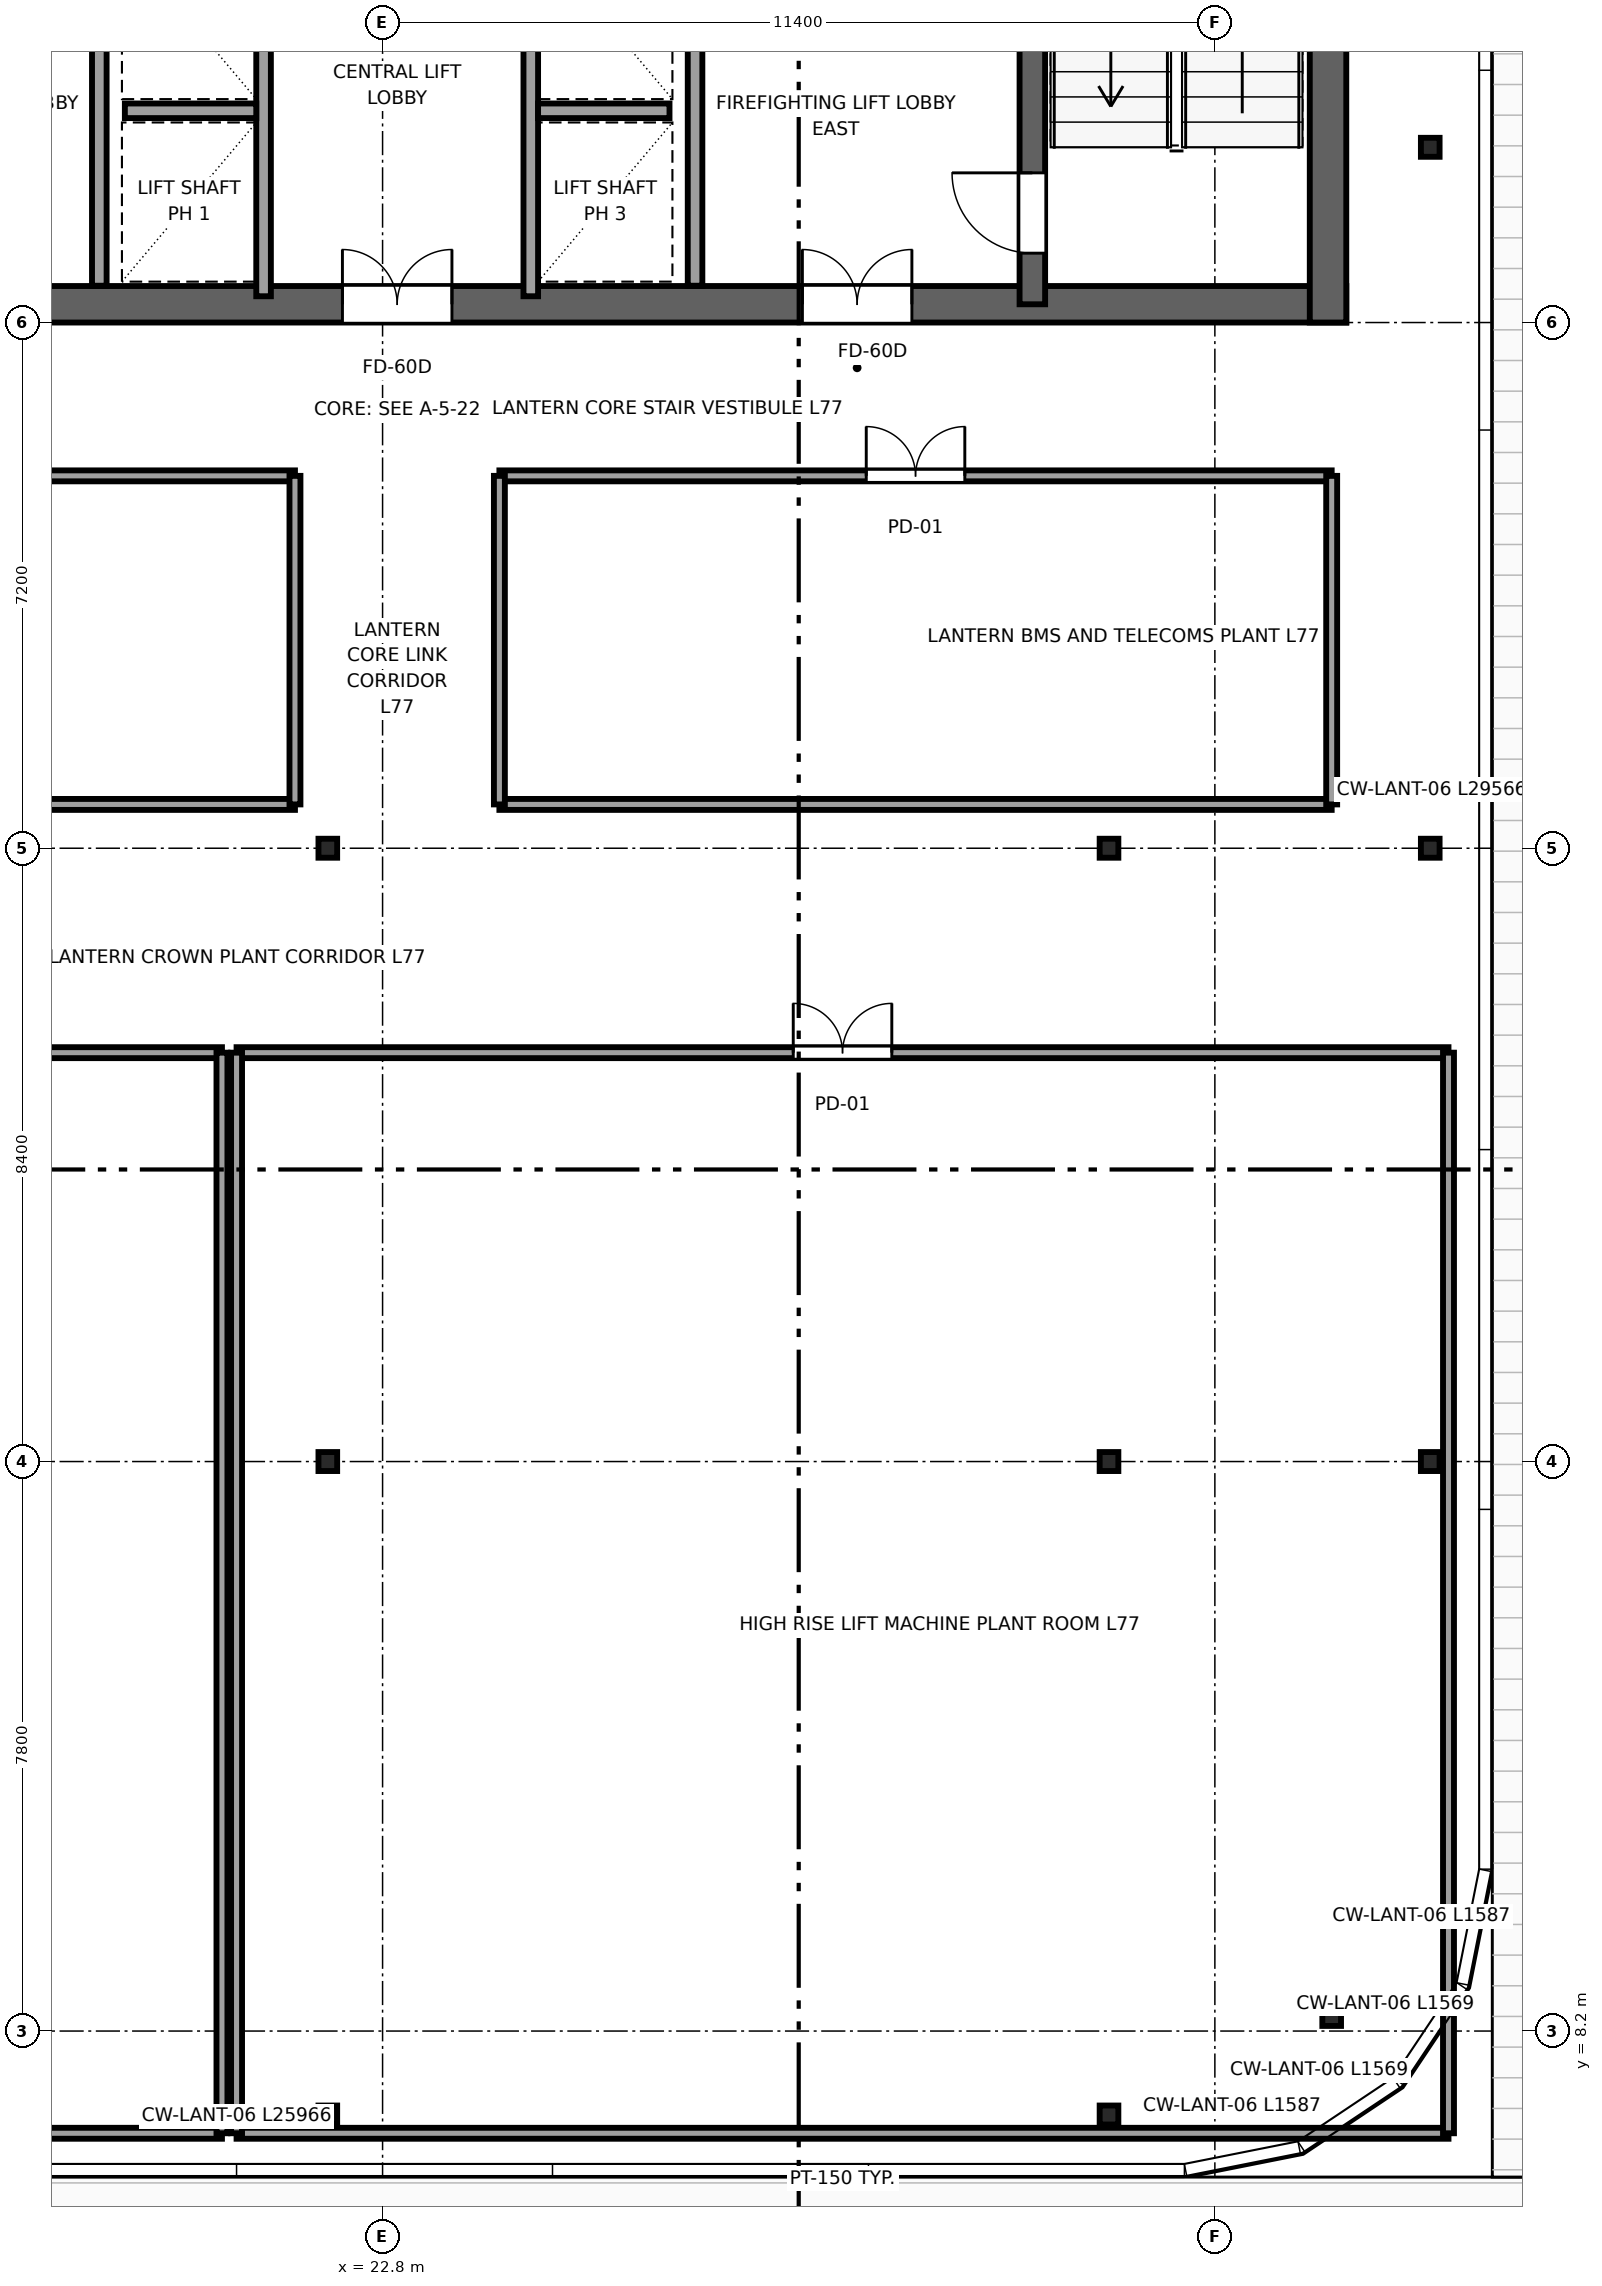
"""IFC4 building model, lengths in metres.
Left out: names, types, materials, properties, quantities, classifications, styles, units other than length and angle.
Written with IfcOpenShell. Run it as: python <this file> out.ifc"""

import sys

from ifc_helpers import new_model, si_unit, direction, frame, frame_2d, origin, origin_2d, place, context, subcontext, project, spatial, rectangle, i_section, extrude, source, transform, mapped, element, fill, save


model = new_model("IFC4")
c1 = context("Model", 3, precision=1e-05, world=origin(), true_north=direction((0.0, 1.0)))
c2 = subcontext(c1, "Body", "Model", "MODEL_VIEW")
j1 = project(units=[si_unit("LENGTHUNIT", "METRE"), si_unit("PLANEANGLEUNIT", "RADIAN")], contexts=[c1])
p1 = place(None, origin())
s1 = spatial("IfcSite", under=j1, at=p1, CompositionType="ELEMENT")
p2 = place(p1, origin())
s2 = spatial("IfcBuilding", under=s1, at=p2, CompositionType="ELEMENT")
p3 = place(p2, frame((0.0, 0.0, 290.95)))
s3 = spatial("IfcBuildingStorey", under=s2, at=p3, CompositionType="ELEMENT", Elevation=290.95)
p4 = place(p3, frame((10.0, 31.85, 0.0), z_axis=(0.0, 0.0, 1.0), x_axis=(1.0, 0.0, 0.0)))
e1 = element("IfcWall", 1, at=p4, inside=s3, PredefinedType="SHEAR", context=c2, shape_type="SweptSolid", body=[
    extrude(rectangle(XDim=26.0, YDim=0.5, at=frame_2d((13.0, 0.0))), origin(), (0.0, 0.0, 1.0), 3.8),
])
p5 = place(p4, frame((7.45, 0.0, 0.0), z_axis=(0.0, 0.0, 1.0), x_axis=(-1.0, 0.0, 0.0)))
e2 = element("IfcOpeningElement", 2, at=p5, cuts=e1, PredefinedType="OPENING", context=c2, shape_type="SweptSolid", body=[
    extrude(rectangle(XDim=1.5, YDim=2.04, at=frame_2d((0.75, 1.02))), frame((0.0, 0.26, 0.0), z_axis=(0.0, -1.0, 0.0), x_axis=(1.0, 0.0, 0.0)), (0.0, 0.0, 1.0), 0.52),
])
p6 = place(p4, frame((13.75, 0.0, 0.0), z_axis=(0.0, 0.0, 1.0), x_axis=(-1.0, 0.0, 0.0)))
e3 = element("IfcOpeningElement", 3, at=p6, cuts=e1, PredefinedType="OPENING", context=c2, shape_type="SweptSolid", body=[
    extrude(rectangle(XDim=1.5, YDim=2.04, at=frame_2d((0.75, 1.02))), frame((0.0, 0.26, 0.0), z_axis=(0.0, -1.0, 0.0), x_axis=(1.0, 0.0, 0.0)), (0.0, 0.0, 1.0), 0.52),
])
p7 = place(p4, frame((20.05, 0.0, 0.0), z_axis=(0.0, 0.0, 1.0), x_axis=(-1.0, 0.0, 0.0)))
e4 = element("IfcOpeningElement", 4, at=p7, cuts=e1, PredefinedType="OPENING", context=c2, shape_type="SweptSolid", body=[
    extrude(rectangle(XDim=1.5, YDim=2.04, at=frame_2d((0.75, 1.02))), frame((0.0, 0.26, 0.0), z_axis=(0.0, -1.0, 0.0), x_axis=(1.0, 0.0, 0.0)), (0.0, 0.0, 1.0), 0.52),
])
p8 = place(p3, frame((35.75, 31.6, 0.0), z_axis=(0.0, 0.0, 1.0), x_axis=(0.0, 1.0, 0.0)))
e5 = element("IfcWall", 5, at=p8, inside=s3, PredefinedType="SHEAR", context=c2, shape_type="SweptSolid", body=[
    extrude(rectangle(XDim=12.6, YDim=0.5, at=frame_2d((6.3, 0.0))), origin(), (0.0, 0.0, 1.0), 3.8),
])
p9 = place(p3, frame((31.7, 31.85, 0.0), z_axis=(0.0, 0.0, 1.0), x_axis=(0.0, 1.0, 0.0)))
e6 = element("IfcWall", 6, at=p9, inside=s3, PredefinedType="SHEAR", context=c2, shape_type="SweptSolid", body=[
    extrude(rectangle(XDim=12.1, YDim=0.35, at=frame_2d((6.05, 0.0))), origin(), (0.0, 0.0, 1.0), 3.8),
])
p10 = place(p9, frame((1.8, 0.0, 0.0), z_axis=(0.0, 0.0, 1.0), x_axis=(-1.0, 0.0, 0.0)))
e7 = element("IfcOpeningElement", 7, at=p10, cuts=e6, PredefinedType="OPENING", context=c2, shape_type="SweptSolid", body=[
    extrude(rectangle(XDim=1.1, YDim=2.12, at=frame_2d((0.55, 1.06))), frame((0.0, 0.185, 0.0), z_axis=(0.0, -1.0, 0.0), x_axis=(1.0, 0.0, 0.0)), (0.0, 0.0, 1.0), 0.37),
])
m1 = source(origin(), c2, "Body", "SweptSolid", [
    extrude(i_section(OverallWidth=0.256, OverallDepth=0.26, WebThickness=0.01, FlangeThickness=0.017, FilletRadius=0.014, at=origin_2d()), origin(), (0.0, 0.0, 1.0), 3.8),
])
for number, where, z_axis, x_axis in (
    (8, (22.05, 7.05, 0.0), (0.0, 0.0, 1.0), (1.0, 0.0, 0.0)),
    (9, (22.05, 16.0, 0.0), (0.0, 0.0, 1.0), (1.0, 0.0, 0.0)),
    (10, (22.05, 24.4, 0.0), (0.0, 0.0, 1.0), (1.0, 0.0, 0.0)),
    (11, (32.75, 7.05, 0.0), (0.0, 0.0, 1.0), (1.0, 0.0, 0.0)),
    (12, (32.75, 16.0, 0.0), (0.0, 0.0, 1.0), (1.0, 0.0, 0.0)),
    (13, (32.75, 24.4, 0.0), (0.0, 0.0, 1.0), (1.0, 0.0, 0.0)),
    (14, (35.8, 8.4, 0.0), (0.0, 0.0, 1.0), (1.0, 0.0, 0.0)),
    (15, (37.15, 16.0, 0.0), (0.0, 0.0, 1.0), (1.0, 0.0, 0.0)),
    (16, (37.15, 24.4, 0.0), (0.0, 0.0, 1.0), (1.0, 0.0, 0.0)),
    (17, (37.15, 34.0, 0.0), (0.0, 0.0, 1.0), (1.0, 0.0, 0.0)),
):
    element("IfcColumn", number, at=place(p3, frame(where, z_axis=z_axis, x_axis=x_axis)), inside=s3, PredefinedType="COLUMN", context=c2, shape_type="MappedRepresentation", body=[
        mapped(m1, transform((0.0, 0.0, 0.0), x_axis=(1.0, 0.0, 0.0), y_axis=(0.0, 1.0, 0.0), z_axis=(0.0, 0.0, 1.0), scale=1.0)),
    ])
for number, where, z_axis, x_axis in (
    (18, (18.92, 32.104, 0.0), (0.0, 0.0, 1.0), (0.0, 1.0, 0.0)),
    (19, (27.08, 32.104, 0.0), (0.0, 0.0, 1.0), (0.0, 1.0, 0.0)),
):
    element("IfcWall", number, at=place(p3, frame(where, z_axis=z_axis, x_axis=x_axis)), inside=s3, PredefinedType="SOLIDWALL", context=c2, shape_type="SweptSolid", body=[
        extrude(rectangle(XDim=4.046, YDim=0.2, at=frame_2d((2.023, 0.0))), origin(), (0.0, 0.0, 1.0), 3.58),
    ])
p11 = place(p3, frame((21.17, 31.96, 0.0), z_axis=(0.0, 0.0, 1.0), x_axis=(0.0, 1.0, 0.0)))
e20 = element("IfcWall", 20, at=p11, inside=s3, PredefinedType="SOLIDWALL", context=c2, shape_type="SweptSolid", body=[
    extrude(rectangle(XDim=5.08, YDim=0.2, at=frame_2d((2.54, 0.0))), origin(), (0.0, 0.0, 1.0), 3.58),
])
p12 = place(p3, frame((19.27, 34.5, 0.0), z_axis=(0.0, 0.0, 1.0), x_axis=(1.0, 0.0, 0.0)))
e21 = element("IfcWall", 21, at=p12, inside=s3, PredefinedType="SOLIDWALL", context=c2, shape_type="SweptSolid", body=[
    extrude(rectangle(XDim=1.8, YDim=0.2, at=frame_2d((0.9, 0.0))), origin(), (0.0, 0.0, 1.0), 3.58),
])
p13 = place(p3, frame((24.83, 31.96, 0.0), z_axis=(0.0, 0.0, 1.0), x_axis=(0.0, 1.0, 0.0)))
e22 = element("IfcWall", 22, at=p13, inside=s3, PredefinedType="SOLIDWALL", context=c2, shape_type="SweptSolid", body=[
    extrude(rectangle(XDim=5.08, YDim=0.2, at=frame_2d((2.54, 0.0))), origin(), (0.0, 0.0, 1.0), 3.58),
])
p14 = place(p3, frame((24.93, 34.5, 0.0), z_axis=(0.0, 0.0, 1.0), x_axis=(1.0, 0.0, 0.0)))
e23 = element("IfcWall", 23, at=p14, inside=s3, PredefinedType="SOLIDWALL", context=c2, shape_type="SweptSolid", body=[
    extrude(rectangle(XDim=1.8, YDim=0.2, at=frame_2d((0.9, 0.0))), origin(), (0.0, 0.0, 1.0), 3.58),
])
p15 = place(p3, frame((4.2, 6.8, 0.0), z_axis=(0.0, 0.0, 1.0), x_axis=(1.0, 0.0, 0.0)))
e24 = element("IfcWall", 24, at=p15, inside=s3, PredefinedType="PARTITIONING", context=c2, shape_type="SweptSolid", body=[
    extrude(rectangle(XDim=16.4, YDim=0.15, at=frame_2d((8.2, 0.0))), origin(), (0.0, 0.0, 1.0), 2.37),
])
p16 = place(p3, frame((4.2, 21.6, 0.0), z_axis=(0.0, 0.0, 1.0), x_axis=(1.0, 0.0, 0.0)))
e25 = element("IfcWall", 25, at=p16, inside=s3, PredefinedType="PARTITIONING", context=c2, shape_type="SweptSolid", body=[
    extrude(rectangle(XDim=16.4, YDim=0.15, at=frame_2d((8.2, 0.0))), origin(), (0.0, 0.0, 1.0), 3.58),
])
p17 = place(p16, frame((7.525, 0.0, 0.0)))
e26 = element("IfcOpeningElement", 26, at=p17, cuts=e25, PredefinedType="OPENING", context=c2, shape_type="SweptSolid", body=[
    extrude(rectangle(XDim=1.35, YDim=2.15, at=frame_2d((0.675, 1.075))), frame((0.0, 0.085, 0.0), z_axis=(0.0, -1.0, 0.0), x_axis=(1.0, 0.0, 0.0)), (0.0, 0.0, 1.0), 0.17),
])
p18 = place(p3, frame((20.6, 6.8, 0.0), z_axis=(0.0, 0.0, 1.0), x_axis=(0.0, 1.0, 0.0)))
e27 = element("IfcWall", 27, at=p18, inside=s3, PredefinedType="PARTITIONING", context=c2, shape_type="SweptSolid", body=[
    extrude(rectangle(XDim=14.8, YDim=0.15, at=frame_2d((7.4, 0.0))), origin(), (0.0, 0.0, 1.0), 3.58),
])
p19 = place(p3, frame((20.8, 6.8, 0.0), z_axis=(0.0, 0.0, 1.0), x_axis=(1.0, 0.0, 0.0)))
e28 = element("IfcWall", 28, at=p19, inside=s3, PredefinedType="PARTITIONING", context=c2, shape_type="SweptSolid", body=[
    extrude(rectangle(XDim=16.6, YDim=0.15, at=frame_2d((8.3, 0.0))), origin(), (0.0, 0.0, 1.0), 2.37),
])
p20 = place(p3, frame((20.8, 21.6, 0.0), z_axis=(0.0, 0.0, 1.0), x_axis=(1.0, 0.0, 0.0)))
e29 = element("IfcWall", 29, at=p20, inside=s3, PredefinedType="PARTITIONING", context=c2, shape_type="SweptSolid", body=[
    extrude(rectangle(XDim=16.6, YDim=0.15, at=frame_2d((8.3, 0.0))), origin(), (0.0, 0.0, 1.0), 3.58),
])
p21 = place(p20, frame((7.625, 0.0, 0.0)))
e30 = element("IfcOpeningElement", 30, at=p21, cuts=e29, PredefinedType="OPENING", context=c2, shape_type="SweptSolid", body=[
    extrude(rectangle(XDim=1.35, YDim=2.15, at=frame_2d((0.675, 1.075))), frame((0.0, 0.085, 0.0), z_axis=(0.0, -1.0, 0.0), x_axis=(1.0, 0.0, 0.0)), (0.0, 0.0, 1.0), 0.17),
])
p22 = place(p3, frame((20.8, 6.8, 0.0), z_axis=(0.0, 0.0, 1.0), x_axis=(0.0, 1.0, 0.0)))
e31 = element("IfcWall", 31, at=p22, inside=s3, PredefinedType="PARTITIONING", context=c2, shape_type="SweptSolid", body=[
    extrude(rectangle(XDim=14.8, YDim=0.15, at=frame_2d((7.4, 0.0))), origin(), (0.0, 0.0, 1.0), 3.58),
])
p23 = place(p3, frame((37.4, 6.8, 0.0), z_axis=(0.0, 0.0, 1.0), x_axis=(0.0, 1.0, 0.0)))
e32 = element("IfcWall", 32, at=p23, inside=s3, PredefinedType="PARTITIONING", context=c2, shape_type="SweptSolid", body=[
    extrude(rectangle(XDim=14.8, YDim=0.15, at=frame_2d((7.4, 0.0))), origin(), (0.0, 0.0, 1.0), 2.37),
])
p24 = place(p3, frame((11.3, 25.0, 0.0), z_axis=(0.0, 0.0, 1.0), x_axis=(1.0, 0.0, 0.0)))
e33 = element("IfcWall", 33, at=p24, inside=s3, PredefinedType="PARTITIONING", context=c2, shape_type="SweptSolid", body=[
    extrude(rectangle(XDim=10.3, YDim=0.15, at=frame_2d((5.15, 0.0))), origin(), (0.0, 0.0, 1.0), 3.58),
])
p25 = place(p3, frame((11.3, 29.5, 0.0), z_axis=(0.0, 0.0, 1.0), x_axis=(1.0, 0.0, 0.0)))
e34 = element("IfcWall", 34, at=p25, inside=s3, PredefinedType="PARTITIONING", context=c2, shape_type="SweptSolid", body=[
    extrude(rectangle(XDim=10.3, YDim=0.15, at=frame_2d((5.15, 0.0))), origin(), (0.0, 0.0, 1.0), 3.58),
])
p26 = place(p25, frame((4.475, 0.0, 0.0)))
e35 = element("IfcOpeningElement", 35, at=p26, cuts=e34, PredefinedType="OPENING", context=c2, shape_type="SweptSolid", body=[
    extrude(rectangle(XDim=1.35, YDim=2.15, at=frame_2d((0.675, 1.075))), frame((0.0, 0.085, 0.0), z_axis=(0.0, -1.0, 0.0), x_axis=(1.0, 0.0, 0.0)), (0.0, 0.0, 1.0), 0.17),
])
p27 = place(p3, frame((21.6, 25.0, 0.0), z_axis=(0.0, 0.0, 1.0), x_axis=(0.0, 1.0, 0.0)))
e36 = element("IfcWall", 36, at=p27, inside=s3, PredefinedType="PARTITIONING", context=c2, shape_type="SweptSolid", body=[
    extrude(rectangle(XDim=4.5, YDim=0.15, at=frame_2d((2.25, 0.0))), origin(), (0.0, 0.0, 1.0), 3.58),
])
p28 = place(p3, frame((24.4, 25.0, 0.0), z_axis=(0.0, 0.0, 1.0), x_axis=(1.0, 0.0, 0.0)))
e37 = element("IfcWall", 37, at=p28, inside=s3, PredefinedType="PARTITIONING", context=c2, shape_type="SweptSolid", body=[
    extrude(rectangle(XDim=11.4, YDim=0.15, at=frame_2d((5.7, 0.0))), origin(), (0.0, 0.0, 1.0), 3.58),
])
p29 = place(p3, frame((24.4, 29.5, 0.0), z_axis=(0.0, 0.0, 1.0), x_axis=(1.0, 0.0, 0.0)))
e38 = element("IfcWall", 38, at=p29, inside=s3, PredefinedType="PARTITIONING", context=c2, shape_type="SweptSolid", body=[
    extrude(rectangle(XDim=11.4, YDim=0.15, at=frame_2d((5.7, 0.0))), origin(), (0.0, 0.0, 1.0), 3.58),
])
p30 = place(p29, frame((5.025, 0.0, 0.0)))
e39 = element("IfcOpeningElement", 39, at=p30, cuts=e38, PredefinedType="OPENING", context=c2, shape_type="SweptSolid", body=[
    extrude(rectangle(XDim=1.35, YDim=2.15, at=frame_2d((0.675, 1.075))), frame((0.0, 0.085, 0.0), z_axis=(0.0, -1.0, 0.0), x_axis=(1.0, 0.0, 0.0)), (0.0, 0.0, 1.0), 0.17),
])
for number, where, z_axis, x_axis in (
    (40, (24.4, 25.0, 0.0), (0.0, 0.0, 1.0), (0.0, 1.0, 0.0)),
    (41, (35.8, 25.0, 0.0), (0.0, 0.0, 1.0), (0.0, 1.0, 0.0)),
):
    element("IfcWall", number, at=place(p3, frame(where, z_axis=z_axis, x_axis=x_axis)), inside=s3, PredefinedType="PARTITIONING", context=c2, shape_type="SweptSolid", body=[
        extrude(rectangle(XDim=4.5, YDim=0.15, at=frame_2d((2.25, 0.0))), origin(), (0.0, 0.0, 1.0), 3.58),
    ])
m2 = source(origin(), c2, "Body", "SweptSolid", [
    extrude(rectangle(XDim=1.1, YDim=2.12, at=frame_2d((0.55, 1.06))), frame((0.0, 0.025, 0.0), z_axis=(0.0, -1.0, 0.0), x_axis=(1.0, 0.0, 0.0)), (0.0, 0.0, 1.0), 0.05),
])
p31 = place(p10, origin())
e42 = element("IfcDoor", 42, at=p31, inside=s3, OperationType="SINGLE_SWING_RIGHT", PredefinedType="DOOR", context=c2, shape_type="MappedRepresentation", body=[
    mapped(m2, transform((0.0, 0.0, 0.0), x_axis=(1.0, 0.0, 0.0), y_axis=(0.0, 1.0, 0.0), z_axis=(0.0, 0.0, 1.0), scale=1.0)),
])
fill(e7, e42)
m3 = source(origin(), c2, "Body", "SweptSolid", [
    extrude(rectangle(XDim=1.5, YDim=2.04, at=frame_2d((0.75, 1.02))), frame((0.0, 0.025, 0.0), z_axis=(0.0, -1.0, 0.0), x_axis=(1.0, 0.0, 0.0)), (0.0, 0.0, 1.0), 0.05),
])
p32 = place(p6, origin())
e43 = element("IfcDoor", 43, at=p32, inside=s3, OperationType="DOUBLE_DOOR_SINGLE_SWING", PredefinedType="DOOR", context=c2, shape_type="MappedRepresentation", body=[
    mapped(m3, transform((0.0, 0.0, 0.0), x_axis=(1.0, 0.0, 0.0), y_axis=(0.0, 1.0, 0.0), z_axis=(0.0, 0.0, 1.0), scale=1.0)),
])
fill(e3, e43)
p33 = place(p7, origin())
e44 = element("IfcDoor", 44, at=p33, inside=s3, OperationType="DOUBLE_DOOR_SINGLE_SWING", PredefinedType="DOOR", context=c2, shape_type="MappedRepresentation", body=[
    mapped(m3, transform((0.0, 0.0, 0.0), x_axis=(1.0, 0.0, 0.0), y_axis=(0.0, 1.0, 0.0), z_axis=(0.0, 0.0, 1.0), scale=1.0)),
])
fill(e4, e44)
m4 = source(origin(), c2, "Body", "SweptSolid", [
    extrude(rectangle(XDim=1.35, YDim=2.15, at=frame_2d((0.675, 1.075))), frame((0.0, 0.025, 0.0), z_axis=(0.0, -1.0, 0.0), x_axis=(1.0, 0.0, 0.0)), (0.0, 0.0, 1.0), 0.05),
])
p34 = place(p21, origin())
e45 = element("IfcDoor", 45, at=p34, inside=s3, OperationType="DOUBLE_DOOR_SINGLE_SWING", PredefinedType="DOOR", context=c2, shape_type="MappedRepresentation", body=[
    mapped(m4, transform((0.0, 0.0, 0.0), x_axis=(1.0, 0.0, 0.0), y_axis=(0.0, 1.0, 0.0), z_axis=(0.0, 0.0, 1.0), scale=1.0)),
])
fill(e30, e45)
p35 = place(p30, origin())
e46 = element("IfcDoor", 46, at=p35, inside=s3, OperationType="DOUBLE_DOOR_SINGLE_SWING", PredefinedType="DOOR", context=c2, shape_type="MappedRepresentation", body=[
    mapped(m4, transform((0.0, 0.0, 0.0), x_axis=(1.0, 0.0, 0.0), y_axis=(0.0, 1.0, 0.0), z_axis=(0.0, 0.0, 1.0), scale=1.0)),
])
fill(e39, e46)
save(model, sys.argv[1])
